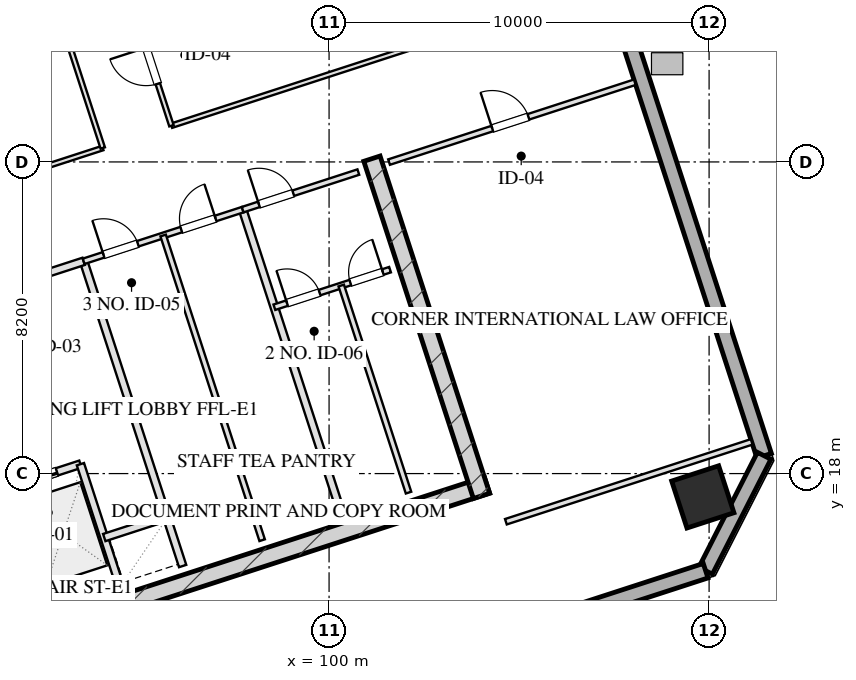
"""IFC4 building model, lengths in metres.
Left out: names, types, materials, properties, quantities, classifications, styles, units other than length and angle.
Written with IfcOpenShell. Run it as: python <this file> out.ifc"""

import sys

from ifc_helpers import new_model, si_unit, direction, frame, frame_2d, origin, origin_2d, place, context, subcontext, project, spatial, rectangle, hollow_rectangle, extrude, element, fill, save


model = new_model("IFC4")
c1 = context("Model", 3, precision=1e-05, world=origin(), true_north=direction((0.0, 1.0)))
c2 = subcontext(c1, "Body", "Model", "MODEL_VIEW")
j1 = project(units=[si_unit("LENGTHUNIT", "METRE"), si_unit("PLANEANGLEUNIT", "RADIAN")], contexts=[c1])
p1 = place(None, origin())
s1 = spatial("IfcSite", under=j1, at=p1, CompositionType="ELEMENT")
p2 = place(p1, origin())
s2 = spatial("IfcBuilding", under=s1, at=p2, CompositionType="ELEMENT")
p3 = place(p2, frame((0.0, 0.0, 195.5)))
s3 = spatial("IfcBuildingStorey", under=s2, at=p3, CompositionType="ELEMENT", Elevation=195.5)
p4 = place(p3, frame((88.701, 12.675, 0.0), z_axis=(0.0, 0.0, 1.0), x_axis=(0.95105824505, 0.309011673763, 0.0)))
e1 = element("IfcWall", 1, at=p4, inside=s3, PredefinedType="SHEAR", context=c2, shape_type="SweptSolid", body=[
    extrude(rectangle(XDim=16.25, YDim=0.45, at=frame_2d((8.125, 0.0))), origin(), (0.0, 0.0, 1.0), 3.45),
])
p5 = place(p3, frame((101.128, 26.286, 0.0), z_axis=(0.0, 0.0, 1.0), x_axis=(0.309004419953, -0.951060601881, 0.0)))
e2 = element("IfcWall", 2, at=p5, inside=s3, PredefinedType="SHEAR", context=c2, shape_type="SweptSolid", body=[
    extrude(rectangle(XDim=9.33, YDim=0.45, at=frame_2d((4.665, 0.0))), origin(), (0.0, 0.0, 1.0), 3.45),
])
p6 = place(p3, frame((90.486, 20.594, 0.0), z_axis=(0.0, 0.0, 1.0), x_axis=(0.309020428229, -0.951055400562, 0.0)))
e3 = element("IfcWall", 3, at=p6, inside=s3, PredefinedType="SHEAR", context=c2, shape_type="SweptSolid", body=[
    extrude(rectangle(XDim=6.98, YDim=0.35, at=frame_2d((3.49, 0.0))), origin(), (0.0, 0.0, 1.0), 3.45),
])
p7 = place(p3, frame((109.835, 17.386, 0.0), z_axis=(0.0, 0.0, 1.0), x_axis=(0.951056516295, 0.309016994375, 0.0)))
e4 = element("IfcColumn", 4, at=p7, inside=s3, PredefinedType="COLUMN", context=c2, shape_type="SweptSolid", body=[
    extrude(hollow_rectangle(XDim=1.3, YDim=1.3, WallThickness=0.045, at=origin_2d()), origin(), (0.0, 0.0, 1.0), 3.451),
])
p8 = place(p3, frame((98.224, 59.173, 0.0), z_axis=(0.0, 0.0, 1.0), x_axis=(0.309014228706, -0.951057414911, 0.0)))
e5 = element("IfcWall", 5, at=p8, inside=s3, PredefinedType="SOLIDWALL", context=c2, shape_type="SweptSolid", body=[
    extrude(rectangle(XDim=42.8, YDim=0.4, at=frame_2d((21.4, 0.0))), origin(), (0.0, 0.0, 1.0), 2.61),
])
p9 = place(p8, frame((17.75, 0.0, 0.75)))
e6 = element("IfcOpeningElement", 6, at=p9, cuts=e5, PredefinedType="OPENING", context=c2, shape_type="SweptSolid", body=[
    extrude(rectangle(XDim=2.1, YDim=1.46, at=frame_2d((1.05, 0.73))), frame((0.0, 0.21, 0.0), z_axis=(0.0, -1.0, 0.0), x_axis=(1.0, 0.0, 0.0)), (0.0, 0.0, 1.0), 0.42),
])
p10 = place(p8, frame((13.95, 0.0, 0.75)))
e7 = element("IfcOpeningElement", 7, at=p10, cuts=e5, PredefinedType="OPENING", context=c2, shape_type="SweptSolid", body=[
    extrude(rectangle(XDim=2.1, YDim=1.46, at=frame_2d((1.05, 0.73))), frame((0.0, 0.21, 0.0), z_axis=(0.0, -1.0, 0.0), x_axis=(1.0, 0.0, 0.0)), (0.0, 0.0, 1.0), 0.42),
])
p11 = place(p8, frame((23.95, 0.0, 0.0)))
e8 = element("IfcOpeningElement", 8, at=p11, cuts=e5, PredefinedType="OPENING", context=c2, shape_type="SweptSolid", body=[
    extrude(rectangle(XDim=1.1, YDim=2.15, at=frame_2d((0.55, 1.075))), frame((0.0, 0.21, 0.0), z_axis=(0.0, -1.0, 0.0), x_axis=(1.0, 0.0, 0.0)), (0.0, 0.0, 1.0), 0.42),
])
p12 = place(p3, frame((111.449, 18.468, 0.0), z_axis=(0.0, 0.0, 1.0), x_axis=(-0.454019523198, -0.890991735402, 0.0)))
e9 = element("IfcWall", 9, at=p12, inside=s3, PredefinedType="SOLIDWALL", context=c2, shape_type="SweptSolid", body=[
    extrude(rectangle(XDim=3.394, YDim=0.4, at=frame_2d((1.697, 0.0))), origin(), (0.0, 0.0, 1.0), 2.61),
])
p13 = place(p3, frame((109.908, 15.444, 0.0), z_axis=(0.0, 0.0, 1.0), x_axis=(-0.951057580055, -0.30901372044, 0.0)))
e10 = element("IfcWall", 10, at=p13, inside=s3, PredefinedType="SOLIDWALL", context=c2, shape_type="SweptSolid", body=[
    extrude(rectangle(XDim=26.4, YDim=0.4, at=frame_2d((13.2, 0.0))), origin(), (0.0, 0.0, 1.0), 2.61),
])
p14 = place(p3, frame((93.542, 23.585, 0.0), z_axis=(0.0, 0.0, 1.0), x_axis=(0.309042196757, -0.951048327176, 0.0)))
e11 = element("IfcWall", 11, at=p14, inside=s3, PredefinedType="PARTITIONING", context=c2, shape_type="SweptSolid", body=[
    extrude(rectangle(XDim=8.43, YDim=0.2, at=frame_2d((4.215, 0.0))), origin(), (0.0, 0.0, 1.0), 3.175),
])
p15 = place(p3, frame((89.899, 22.401, 0.0), z_axis=(0.0, 0.0, 1.0), x_axis=(0.951046716504, 0.309047153403, 0.0)))
e12 = element("IfcWall", 12, at=p15, inside=s3, PredefinedType="PARTITIONING", context=c2, shape_type="SweptSolid", body=[
    extrude(rectangle(XDim=3.83, YDim=0.2, at=frame_2d((1.915, 0.0))), origin(), (0.0, 0.0, 1.0), 3.175),
])
p16 = place(p15, frame((1.35, 0.0, 0.0)))
e13 = element("IfcOpeningElement", 13, at=p16, cuts=e12, PredefinedType="OPENING", context=c2, shape_type="SweptSolid", body=[
    extrude(rectangle(XDim=1.2, YDim=2.05, at=frame_2d((0.6, 1.025))), frame((0.0, 0.11, 0.0), z_axis=(0.0, -1.0, 0.0), x_axis=(1.0, 0.0, 0.0)), (0.0, 0.0, 1.0), 0.22),
])
p17 = place(p3, frame((91.46, 17.598, 0.0), z_axis=(0.0, 0.0, 1.0), x_axis=(0.951062257173, 0.308999325213, 0.0)))
e14 = element("IfcWall", 14, at=p17, inside=s3, PredefinedType="PARTITIONING", context=c2, shape_type="SweptSolid", body=[
    extrude(rectangle(XDim=2.1, YDim=0.2, at=frame_2d((1.05, 0.0))), origin(), (0.0, 0.0, 1.0), 3.175),
])
p18 = place(p17, frame((0.35, 0.0, 0.0)))
e15 = element("IfcOpeningElement", 15, at=p18, cuts=e14, PredefinedType="OPENING", context=c2, shape_type="SweptSolid", body=[
    extrude(rectangle(XDim=1.1, YDim=2.05, at=frame_2d((0.55, 1.025))), frame((0.0, 0.11, 0.0), z_axis=(0.0, -1.0, 0.0), x_axis=(1.0, 0.0, 0.0)), (0.0, 0.0, 1.0), 0.22),
])
p19 = place(p3, frame((93.457, 18.247, 0.0), z_axis=(0.0, 0.0, 1.0), x_axis=(0.3089935693, -0.951064127245, 0.0)))
e16 = element("IfcWall", 16, at=p19, inside=s3, PredefinedType="PARTITIONING", context=c2, shape_type="SweptSolid", body=[
    extrude(rectangle(XDim=3.7, YDim=0.2, at=frame_2d((1.85, 0.0))), origin(), (0.0, 0.0, 1.0), 3.175),
])
p20 = place(p3, frame((94.084, 16.317, 0.0), z_axis=(0.0, 0.0, 1.0), x_axis=(0.951041328149, 0.309063734775, 0.0)))
e17 = element("IfcWall", 17, at=p20, inside=s3, PredefinedType="PARTITIONING", context=c2, shape_type="SweptSolid", body=[
    extrude(rectangle(XDim=1.73, YDim=0.2, at=frame_2d((0.865, 0.0))), origin(), (0.0, 0.0, 1.0), 3.175),
])
p21 = place(p3, frame((97.727, 24.944, 0.0), z_axis=(0.0, 0.0, 1.0), x_axis=(0.309016001439, -0.951056838919, 0.0)))
e18 = element("IfcWall", 18, at=p21, inside=s3, PredefinedType="PARTITIONING", context=c2, shape_type="SweptSolid", body=[
    extrude(rectangle(XDim=8.43, YDim=0.2, at=frame_2d((4.215, 0.0))), origin(), (0.0, 0.0, 1.0), 3.175),
])
p22 = place(p3, frame((93.542, 23.585, 0.0), z_axis=(0.0, 0.0, 1.0), x_axis=(0.951063829732, 0.308994485023, 0.0)))
e19 = element("IfcWall", 19, at=p22, inside=s3, PredefinedType="PARTITIONING", context=c2, shape_type="SweptSolid", body=[
    extrude(rectangle(XDim=4.4, YDim=0.15, at=frame_2d((2.2, 0.0))), origin(), (0.0, 0.0, 1.0), 3.175),
])
p23 = place(p22, frame((0.55, 0.0, 0.0)))
e20 = element("IfcOpeningElement", 20, at=p23, cuts=e19, PredefinedType="OPENING", context=c2, shape_type="SweptSolid", body=[
    extrude(rectangle(XDim=0.95, YDim=2.05, at=frame_2d((0.475, 1.025))), frame((0.0, 0.085, 0.0), z_axis=(0.0, -1.0, 0.0), x_axis=(1.0, 0.0, 0.0)), (0.0, 0.0, 1.0), 0.17),
])
p24 = place(p22, frame((2.7, 0.0, 0.0)))
e21 = element("IfcOpeningElement", 21, at=p24, cuts=e19, PredefinedType="OPENING", context=c2, shape_type="SweptSolid", body=[
    extrude(rectangle(XDim=0.95, YDim=2.05, at=frame_2d((0.475, 1.025))), frame((0.0, 0.085, 0.0), z_axis=(0.0, -1.0, 0.0), x_axis=(1.0, 0.0, 0.0)), (0.0, 0.0, 1.0), 0.17),
])
p25 = place(p3, frame((95.634, 24.265, 0.0), z_axis=(0.0, 0.0, 1.0), x_axis=(0.309007490203, -0.951059604335, 0.0)))
e22 = element("IfcWall", 22, at=p25, inside=s3, PredefinedType="PARTITIONING", context=c2, shape_type="SweptSolid", body=[
    extrude(rectangle(XDim=8.43, YDim=0.15, at=frame_2d((4.215, 0.0))), origin(), (0.0, 0.0, 1.0), 3.175),
])
p26 = place(p3, frame((97.727, 24.944, 0.0), z_axis=(0.0, 0.0, 1.0), x_axis=(0.951036872128, 0.309077446369, 0.0)))
e23 = element("IfcWall", 23, at=p26, inside=s3, PredefinedType="PARTITIONING", context=c2, shape_type="SweptSolid", body=[
    extrude(rectangle(XDim=3.2, YDim=0.15, at=frame_2d((1.6, 0.0))), origin(), (0.0, 0.0, 1.0), 3.175),
])
p27 = place(p26, frame((0.45, 0.0, 0.0)))
e24 = element("IfcOpeningElement", 24, at=p27, cuts=e23, PredefinedType="OPENING", context=c2, shape_type="SweptSolid", body=[
    extrude(rectangle(XDim=0.95, YDim=2.05, at=frame_2d((0.475, 1.025))), frame((0.0, 0.085, 0.0), z_axis=(0.0, -1.0, 0.0), x_axis=(1.0, 0.0, 0.0)), (0.0, 0.0, 1.0), 0.17),
])
p28 = place(p3, frame((98.561, 22.376, 0.0), z_axis=(0.0, 0.0, 1.0), x_axis=(0.95104415986, 0.309055020985, 0.0)))
e25 = element("IfcWall", 25, at=p28, inside=s3, PredefinedType="PARTITIONING", context=c2, shape_type="SweptSolid", body=[
    extrude(rectangle(XDim=3.2, YDim=0.15, at=frame_2d((1.6, 0.0))), origin(), (0.0, 0.0, 1.0), 3.175),
])
p29 = place(p28, frame((0.35, 0.0, 0.0)))
e26 = element("IfcOpeningElement", 26, at=p29, cuts=e25, PredefinedType="OPENING", context=c2, shape_type="SweptSolid", body=[
    extrude(rectangle(XDim=0.9, YDim=2.05, at=frame_2d((0.45, 1.025))), frame((0.0, 0.085, 0.0), z_axis=(0.0, -1.0, 0.0), x_axis=(1.0, 0.0, 0.0)), (0.0, 0.0, 1.0), 0.17),
])
p30 = place(p28, frame((2.1, 0.0, 0.0)))
e27 = element("IfcOpeningElement", 27, at=p30, cuts=e25, PredefinedType="OPENING", context=c2, shape_type="SweptSolid", body=[
    extrude(rectangle(XDim=0.9, YDim=2.05, at=frame_2d((0.45, 1.025))), frame((0.0, 0.085, 0.0), z_axis=(0.0, -1.0, 0.0), x_axis=(1.0, 0.0, 0.0)), (0.0, 0.0, 1.0), 0.17),
])
p31 = place(p3, frame((100.32, 22.948, 0.0), z_axis=(0.0, 0.0, 1.0), x_axis=(0.309035009867, -0.951050662518, 0.0)))
e28 = element("IfcWall", 28, at=p31, inside=s3, PredefinedType="PARTITIONING", context=c2, shape_type="SweptSolid", body=[
    extrude(rectangle(XDim=5.73, YDim=0.15, at=frame_2d((2.865, 0.0))), origin(), (0.0, 0.0, 1.0), 3.175),
])
p32 = place(p3, frame((104.653, 16.733, 0.0), z_axis=(0.0, 0.0, 1.0), x_axis=(0.951054383043, 0.309023559774, 0.0)))
e29 = element("IfcWall", 29, at=p32, inside=s3, PredefinedType="PARTITIONING", context=c2, shape_type="SweptSolid", body=[
    extrude(rectangle(XDim=6.8, YDim=0.15, at=frame_2d((3.4, 0.0))), origin(), (0.0, 0.0, 1.0), 3.175),
])
p33 = place(p3, frame((101.578, 26.196, 0.0), z_axis=(0.0, 0.0, 1.0), x_axis=(0.951064934653, 0.308991084134, 0.0)))
e30 = element("IfcWall", 30, at=p33, inside=s3, PredefinedType="PARTITIONING", context=c2, shape_type="SweptSolid", body=[
    extrude(rectangle(XDim=6.8, YDim=0.15, at=frame_2d((3.4, 0.0))), origin(), (0.0, 0.0, 1.0), 3.175),
])
p34 = place(p33, frame((2.856, 0.0, 0.0)))
e31 = element("IfcOpeningElement", 31, at=p34, cuts=e30, PredefinedType="OPENING", context=c2, shape_type="SweptSolid", body=[
    extrude(rectangle(XDim=1.0, YDim=2.05, at=frame_2d((0.5, 1.025))), frame((0.0, 0.085, 0.0), z_axis=(0.0, -1.0, 0.0), x_axis=(1.0, 0.0, 0.0)), (0.0, 0.0, 1.0), 0.17),
])
p35 = place(p3, frame((88.814, 24.867, 0.0), z_axis=(0.0, 0.0, 1.0), x_axis=(0.951061793147, 0.309000753423, 0.0)))
e32 = element("IfcWall", 32, at=p35, inside=s3, PredefinedType="PARTITIONING", context=c2, shape_type="SweptSolid", body=[
    extrude(rectangle(XDim=5.5, YDim=0.12, at=frame_2d((2.75, 0.0))), origin(), (0.0, 0.0, 1.0), 3.175),
])
p36 = place(p3, frame((95.852, 27.153, 0.0), z_axis=(0.0, 0.0, 1.0), x_axis=(0.951054485045, 0.30902324585, 0.0)))
e33 = element("IfcWall", 33, at=p36, inside=s3, PredefinedType="PARTITIONING", context=c2, shape_type="SweptSolid", body=[
    extrude(rectangle(XDim=11.95, YDim=0.12, at=frame_2d((5.975, 0.0))), origin(), (0.0, 0.0, 1.0), 3.175),
])
p37 = place(p3, frame((94.045, 26.566, 0.0), z_axis=(0.0, 0.0, 1.0), x_axis=(-0.30901773025, 0.951056277195, 0.0)))
e34 = element("IfcWall", 34, at=p37, inside=s3, PredefinedType="PARTITIONING", context=c2, shape_type="SweptSolid", body=[
    extrude(rectangle(XDim=16.64, YDim=0.12, at=frame_2d((8.32, 0.0))), origin(), (0.0, 0.0, 1.0), 3.175),
])
p38 = place(p3, frame((95.852, 27.153, 0.0), z_axis=(0.0, 0.0, 1.0), x_axis=(-0.309004459387, 0.951060589068, 0.0)))
e35 = element("IfcWall", 35, at=p38, inside=s3, PredefinedType="PARTITIONING", context=c2, shape_type="SweptSolid", body=[
    extrude(rectangle(XDim=16.64, YDim=0.12, at=frame_2d((8.32, 0.0))), origin(), (0.0, 0.0, 1.0), 3.175),
])
p39 = place(p38, frame((1.16, 0.0, 0.0)))
e36 = element("IfcOpeningElement", 36, at=p39, cuts=e35, PredefinedType="OPENING", context=c2, shape_type="SweptSolid", body=[
    extrude(rectangle(XDim=1.0, YDim=2.05, at=frame_2d((0.5, 1.025))), frame((0.0, 0.07, 0.0), z_axis=(0.0, -1.0, 0.0), x_axis=(1.0, 0.0, 0.0)), (0.0, 0.0, 1.0), 0.14),
])
p40 = place(p38, frame((4.72, 0.0, 0.0)))
e37 = element("IfcOpeningElement", 37, at=p40, cuts=e35, PredefinedType="OPENING", context=c2, shape_type="SweptSolid", body=[
    extrude(rectangle(XDim=1.0, YDim=2.05, at=frame_2d((0.5, 1.025))), frame((0.0, 0.07, 0.0), z_axis=(0.0, -1.0, 0.0), x_axis=(1.0, 0.0, 0.0)), (0.0, 0.0, 1.0), 0.14),
])
p41 = place(p38, frame((7.82, 0.0, 0.0)))
e38 = element("IfcOpeningElement", 38, at=p41, cuts=e35, PredefinedType="OPENING", context=c2, shape_type="SweptSolid", body=[
    extrude(rectangle(XDim=1.05, YDim=2.05, at=frame_2d((0.525, 1.025))), frame((0.0, 0.07, 0.0), z_axis=(0.0, -1.0, 0.0), x_axis=(1.0, 0.0, 0.0)), (0.0, 0.0, 1.0), 0.14),
])
p42 = place(p38, frame((10.92, 0.0, 0.0)))
e39 = element("IfcOpeningElement", 39, at=p42, cuts=e35, PredefinedType="OPENING", context=c2, shape_type="SweptSolid", body=[
    extrude(rectangle(XDim=1.0, YDim=2.05, at=frame_2d((0.5, 1.025))), frame((0.0, 0.07, 0.0), z_axis=(0.0, -1.0, 0.0), x_axis=(1.0, 0.0, 0.0)), (0.0, 0.0, 1.0), 0.14),
])
p43 = place(p38, frame((14.48, 0.0, 0.0)))
e40 = element("IfcOpeningElement", 40, at=p43, cuts=e35, PredefinedType="OPENING", context=c2, shape_type="SweptSolid", body=[
    extrude(rectangle(XDim=1.0, YDim=2.05, at=frame_2d((0.5, 1.025))), frame((0.0, 0.07, 0.0), z_axis=(0.0, -1.0, 0.0), x_axis=(1.0, 0.0, 0.0)), (0.0, 0.0, 1.0), 0.14),
])
p44 = place(p18, origin())
e41 = element("IfcDoor", 41, at=p44, inside=s3, OperationType="DOUBLE_DOOR_SLIDING", PredefinedType="DOOR", context=c2, shape_type="SweptSolid", body=[
    extrude(rectangle(XDim=1.1, YDim=2.05, at=frame_2d((0.55, 1.025))), frame((0.0, 0.025, 0.0), z_axis=(0.0, -1.0, 0.0), x_axis=(1.0, 0.0, 0.0)), (0.0, 0.0, 1.0), 0.05),
])
fill(e15, e41)
p45 = place(p23, origin())
e42 = element("IfcDoor", 42, at=p45, inside=s3, OperationType="SINGLE_SWING_LEFT", PredefinedType="DOOR", context=c2, shape_type="SweptSolid", body=[
    extrude(rectangle(XDim=0.95, YDim=2.05, at=frame_2d((0.475, 1.025))), frame((0.0, 0.025, 0.0), z_axis=(0.0, -1.0, 0.0), x_axis=(1.0, 0.0, 0.0)), (0.0, 0.0, 1.0), 0.05),
])
fill(e20, e42)
p46 = place(p24, origin())
e43 = element("IfcDoor", 43, at=p46, inside=s3, OperationType="SINGLE_SWING_RIGHT", PredefinedType="DOOR", context=c2, shape_type="SweptSolid", body=[
    extrude(rectangle(XDim=0.95, YDim=2.05, at=frame_2d((0.475, 1.025))), frame((0.0, 0.025, 0.0), z_axis=(0.0, -1.0, 0.0), x_axis=(1.0, 0.0, 0.0)), (0.0, 0.0, 1.0), 0.05),
])
fill(e21, e43)
p47 = place(p27, origin())
e44 = element("IfcDoor", 44, at=p47, inside=s3, OperationType="SINGLE_SWING_LEFT", PredefinedType="DOOR", context=c2, shape_type="SweptSolid", body=[
    extrude(rectangle(XDim=0.95, YDim=2.05, at=frame_2d((0.475, 1.025))), frame((0.0, 0.025, 0.0), z_axis=(0.0, -1.0, 0.0), x_axis=(1.0, 0.0, 0.0)), (0.0, 0.0, 1.0), 0.05),
])
fill(e24, e44)
p48 = place(p29, origin())
e45 = element("IfcDoor", 45, at=p48, inside=s3, OperationType="SINGLE_SWING_LEFT", PredefinedType="DOOR", context=c2, shape_type="SweptSolid", body=[
    extrude(rectangle(XDim=0.9, YDim=2.05, at=frame_2d((0.45, 1.025))), frame((0.0, 0.025, 0.0), z_axis=(0.0, -1.0, 0.0), x_axis=(1.0, 0.0, 0.0)), (0.0, 0.0, 1.0), 0.05),
])
fill(e26, e45)
p49 = place(p30, origin())
e46 = element("IfcDoor", 46, at=p49, inside=s3, OperationType="SINGLE_SWING_RIGHT", PredefinedType="DOOR", context=c2, shape_type="SweptSolid", body=[
    extrude(rectangle(XDim=0.9, YDim=2.05, at=frame_2d((0.45, 1.025))), frame((0.0, 0.025, 0.0), z_axis=(0.0, -1.0, 0.0), x_axis=(1.0, 0.0, 0.0)), (0.0, 0.0, 1.0), 0.05),
])
fill(e27, e46)
p50 = place(p34, origin())
e47 = element("IfcDoor", 47, at=p50, inside=s3, OperationType="SINGLE_SWING_LEFT", PredefinedType="DOOR", context=c2, shape_type="SweptSolid", body=[
    extrude(rectangle(XDim=1.0, YDim=2.05, at=frame_2d((0.5, 1.025))), frame((0.0, 0.025, 0.0), z_axis=(0.0, -1.0, 0.0), x_axis=(1.0, 0.0, 0.0)), (0.0, 0.0, 1.0), 0.05),
])
fill(e31, e47)
p51 = place(p39, origin())
e48 = element("IfcDoor", 48, at=p51, inside=s3, OperationType="SINGLE_SWING_RIGHT", PredefinedType="DOOR", context=c2, shape_type="SweptSolid", body=[
    extrude(rectangle(XDim=1.0, YDim=2.05, at=frame_2d((0.5, 1.025))), frame((0.0, 0.025, 0.0), z_axis=(0.0, -1.0, 0.0), x_axis=(1.0, 0.0, 0.0)), (0.0, 0.0, 1.0), 0.05),
])
fill(e36, e48)
save(model, sys.argv[1])
